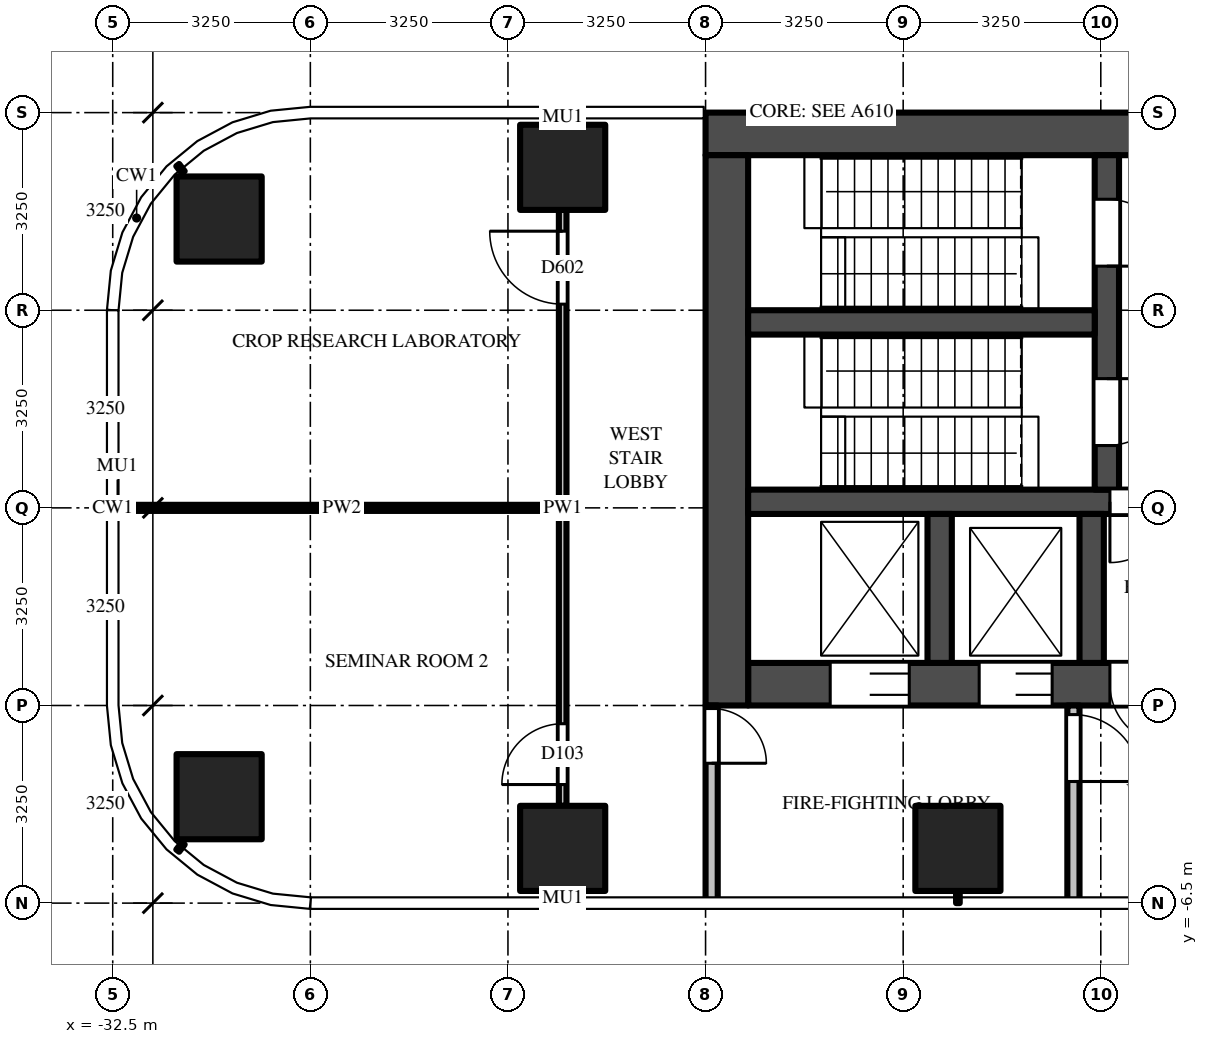
"""IFC4 building model, lengths in metres.
Left out: names, types, materials, properties, quantities, classifications, styles, units other than length and angle.
Written with IfcOpenShell. Run it as: python <this file> out.ifc"""

import sys

from ifc_helpers import new_model, si_unit, direction, frame, frame_2d, origin, origin_2d, place, context, subcontext, project, spatial, rectangle, extrude, source, transform, mapped, element, fill, save


model = new_model("IFC4")
c1 = context("Model", 3, precision=1e-05, world=origin(), true_north=direction((0.0, 1.0)))
c2 = subcontext(c1, "Body", "Model", "MODEL_VIEW")
j1 = project(units=[si_unit("LENGTHUNIT", "METRE"), si_unit("PLANEANGLEUNIT", "RADIAN")], contexts=[c1])
p1 = place(None, origin())
s1 = spatial("IfcSite", under=j1, at=p1, CompositionType="ELEMENT")
p2 = place(p1, origin())
s2 = spatial("IfcBuilding", under=s1, at=p2, CompositionType="ELEMENT")
p3 = place(p2, frame((0.0, 0.0, 79.0)))
s3 = spatial("IfcBuildingStorey", under=s2, at=p3, CompositionType="ELEMENT", Elevation=79.0)
m1 = source(origin(), c2, "Body", "SweptSolid", [
    extrude(rectangle(XDim=1.4, YDim=1.4, at=origin_2d()), origin(), (0.0, 0.0, 1.0), 4.5),
])
for number, where, z_axis, x_axis in (
    (1, (-18.6, -5.6, 0.0), (0.0, 0.0, 1.0), (1.0, 0.0, 0.0)),
    (2, (-25.1, -5.6, 0.0), (0.0, 0.0, 1.0), (1.0, 0.0, 0.0)),
    (3, (-30.75, -4.75, 0.0), (0.0, 0.0, 1.0), (1.0, 0.0, 0.0)),
    (4, (-25.1, 5.6, 0.0), (0.0, 0.0, 1.0), (1.0, 0.0, 0.0)),
    (5, (-30.75, 4.75, 0.0), (0.0, 0.0, 1.0), (1.0, 0.0, 0.0)),
):
    element("IfcColumn", number, at=place(p3, frame(where, z_axis=z_axis, x_axis=x_axis)), inside=s3, PredefinedType="COLUMN", context=c2, shape_type="MappedRepresentation", body=[
        mapped(m1, transform((0.0, 0.0, 0.0))),
    ])
m2 = source(origin(), c2, "Body", "SweptSolid", [
    extrude(rectangle(XDim=16.45, YDim=0.7, at=frame_2d((8.225, 0.0))), origin(), (0.0, 0.0, 1.0), 4.25),
])
p4 = place(p3, frame((-6.3, 6.15, 0.0), z_axis=(0.0, 0.0, 1.0), x_axis=(-1.0, 0.0, 0.0)))
e6 = element("IfcWall", 6, at=p4, inside=s3, PredefinedType="SHEAR", context=c2, shape_type="MappedRepresentation", body=[
    mapped(m2, transform((0.0, 0.0, 0.0))),
])
m3 = source(origin(), c2, "Body", "SweptSolid", [
    extrude(rectangle(XDim=14.85, YDim=0.7, at=frame_2d((7.425, 0.0))), origin(), (0.0, 0.0, 1.0), 4.25),
])
p5 = place(p3, frame((-7.2, -2.9, 0.0), z_axis=(0.0, 0.0, 1.0), x_axis=(-1.0, 0.0, 0.0)))
e7 = element("IfcWall", 7, at=p5, inside=s3, PredefinedType="SHEAR", context=c2, shape_type="MappedRepresentation", body=[
    mapped(m3, transform((0.0, 0.0, 0.0))),
])
m4 = source(origin(), c2, "Body", "SweptSolid", [
    extrude(rectangle(XDim=1.3, YDim=2.1, at=frame_2d((0.65, 1.05))), frame((0.0, 0.36, 0.0), z_axis=(0.0, -1.0, 0.0), x_axis=(1.0, 0.0, 0.0)), (0.0, 0.0, 1.0), 0.72),
])
p6 = place(p5, frame((12.2, 0.0, 0.0)))
e8 = element("IfcOpeningElement", 8, at=p6, cuts=e7, PredefinedType="OPENING", context=c2, shape_type="MappedRepresentation", body=[
    mapped(m4, transform((0.0, 0.0, 0.0))),
])
m5 = source(origin(), c2, "Body", "SweptSolid", [
    extrude(rectangle(XDim=1.2, YDim=2.1, at=frame_2d((0.6, 1.05))), frame((0.0, 0.36, 0.0), z_axis=(0.0, -1.0, 0.0), x_axis=(1.0, 0.0, 0.0)), (0.0, 0.0, 1.0), 0.72),
])
p7 = place(p5, frame((9.85, 0.0, 0.0)))
e9 = element("IfcOpeningElement", 9, at=p7, cuts=e7, PredefinedType="OPENING", context=c2, shape_type="MappedRepresentation", body=[
    mapped(m5, transform((0.0, 0.0, 0.0))),
])
m6 = source(origin(), c2, "Body", "SweptSolid", [
    extrude(rectangle(XDim=1.0, YDim=2.1, at=frame_2d((0.5, 1.05))), frame((0.0, 0.36, 0.0), z_axis=(0.0, -1.0, 0.0), x_axis=(1.0, 0.0, 0.0)), (0.0, 0.0, 1.0), 0.72),
])
p8 = place(p5, frame((7.9, 0.0, 0.0)))
e10 = element("IfcOpeningElement", 10, at=p8, cuts=e7, PredefinedType="OPENING", context=c2, shape_type="MappedRepresentation", body=[
    mapped(m6, transform((0.0, 0.0, 0.0))),
])
m7 = source(origin(), c2, "Body", "SweptSolid", [
    extrude(rectangle(XDim=0.8, YDim=2.1, at=frame_2d((0.4, 1.05))), frame((0.0, 0.36, 0.0), z_axis=(0.0, -1.0, 0.0), x_axis=(1.0, 0.0, 0.0)), (0.0, 0.0, 1.0), 0.72),
])
p9 = place(p5, frame((0.113, 0.0, 0.0)))
e11 = element("IfcOpeningElement", 11, at=p9, cuts=e7, PredefinedType="OPENING", context=c2, shape_type="MappedRepresentation", body=[
    mapped(m7, transform((0.0, 0.0, 0.0))),
])
p10 = place(p5, frame((1.288, 0.0, 0.0)))
e12 = element("IfcOpeningElement", 12, at=p10, cuts=e7, PredefinedType="OPENING", context=c2, shape_type="MappedRepresentation", body=[
    mapped(m7, transform((0.0, 0.0, 0.0))),
])
p11 = place(p5, frame((2.712, 0.0, 0.0)))
e13 = element("IfcOpeningElement", 13, at=p11, cuts=e7, PredefinedType="OPENING", context=c2, shape_type="MappedRepresentation", body=[
    mapped(m7, transform((0.0, 0.0, 0.0))),
])
p12 = place(p5, frame((3.887, 0.0, 0.0)))
e14 = element("IfcOpeningElement", 14, at=p12, cuts=e7, PredefinedType="OPENING", context=c2, shape_type="MappedRepresentation", body=[
    mapped(m7, transform((0.0, 0.0, 0.0))),
])
p13 = place(p5, frame((5.312, 0.0, 0.0)))
e15 = element("IfcOpeningElement", 15, at=p13, cuts=e7, PredefinedType="OPENING", context=c2, shape_type="MappedRepresentation", body=[
    mapped(m7, transform((0.0, 0.0, 0.0))),
])
p14 = place(p5, frame((6.488, 0.0, 0.0)))
e16 = element("IfcOpeningElement", 16, at=p14, cuts=e7, PredefinedType="OPENING", context=c2, shape_type="MappedRepresentation", body=[
    mapped(m7, transform((0.0, 0.0, 0.0))),
])
m8 = source(origin(), c2, "Body", "SweptSolid", [
    extrude(rectangle(XDim=9.05, YDim=0.7, at=frame_2d((4.525, 0.0))), origin(), (0.0, 0.0, 1.0), 4.25),
])
p15 = place(p3, frame((-22.4, 5.8, 0.0), z_axis=(0.0, 0.0, 1.0), x_axis=(0.0, -1.0, 0.0)))
e17 = element("IfcWall", 17, at=p15, inside=s3, PredefinedType="SHEAR", context=c2, shape_type="MappedRepresentation", body=[
    mapped(m8, transform((0.0, 0.0, 0.0))),
])
m9 = source(origin(), c2, "Body", "SweptSolid", [
    extrude(rectangle(XDim=14.85, YDim=0.4, at=frame_2d((7.425, 0.0))), origin(), (0.0, 0.0, 1.0), 4.25),
])
p16 = place(p3, frame((-7.2, 0.1, 0.0), z_axis=(0.0, 0.0, 1.0), x_axis=(-1.0, 0.0, 0.0)))
e18 = element("IfcWall", 18, at=p16, inside=s3, PredefinedType="SHEAR", context=c2, shape_type="MappedRepresentation", body=[
    mapped(m9, transform((0.0, 0.0, 0.0))),
])
m10 = source(origin(), c2, "Body", "SweptSolid", [
    extrude(rectangle(XDim=1.0, YDim=2.1, at=frame_2d((0.5, 1.05))), frame((0.0, 0.21, 0.0), z_axis=(0.0, -1.0, 0.0), x_axis=(1.0, 0.0, 0.0)), (0.0, 0.0, 1.0), 0.42),
])
p17 = place(p16, frame((7.9, 0.0, 0.0)))
e19 = element("IfcOpeningElement", 19, at=p17, cuts=e18, PredefinedType="OPENING", context=c2, shape_type="MappedRepresentation", body=[
    mapped(m10, transform((0.0, 0.0, 0.0))),
])
m11 = source(origin(), c2, "Body", "SweptSolid", [
    extrude(rectangle(XDim=5.5, YDim=0.4, at=frame_2d((2.75, 0.0))), origin(), (0.0, 0.0, 1.0), 4.25),
])
p18 = place(p3, frame((-16.15, 5.8, 0.0), z_axis=(0.0, 0.0, 1.0), x_axis=(0.0, -1.0, 0.0)))
e20 = element("IfcWall", 20, at=p18, inside=s3, PredefinedType="SHEAR", context=c2, shape_type="MappedRepresentation", body=[
    mapped(m11, transform((0.0, 0.0, 0.0))),
])
m12 = source(origin(), c2, "Body", "SweptSolid", [
    extrude(rectangle(XDim=1.1, YDim=2.1, at=frame_2d((0.55, 1.05))), frame((0.0, 0.21, 0.0), z_axis=(0.0, -1.0, 0.0), x_axis=(1.0, 0.0, 0.0)), (0.0, 0.0, 1.0), 0.42),
])
p19 = place(p18, frame((0.725, 0.0, 0.0)))
e21 = element("IfcOpeningElement", 21, at=p19, cuts=e20, PredefinedType="OPENING", context=c2, shape_type="MappedRepresentation", body=[
    mapped(m12, transform((0.0, 0.0, 0.0))),
])
p20 = place(p18, frame((3.675, 0.0, 0.0)))
e22 = element("IfcOpeningElement", 22, at=p20, cuts=e20, PredefinedType="OPENING", context=c2, shape_type="MappedRepresentation", body=[
    mapped(m12, transform((0.0, 0.0, 0.0))),
])
m13 = source(origin(), c2, "Body", "SweptSolid", [
    extrude(rectangle(XDim=5.7, YDim=0.4, at=frame_2d((2.85, 0.0))), origin(), (0.0, 0.0, 1.0), 4.25),
])
p21 = place(p3, frame((-16.35, 3.05, 0.0), z_axis=(0.0, 0.0, 1.0), x_axis=(-1.0, 0.0, 0.0)))
e23 = element("IfcWall", 23, at=p21, inside=s3, PredefinedType="SHEAR", context=c2, shape_type="MappedRepresentation", body=[
    mapped(m13, transform((0.0, 0.0, 0.0))),
])
m14 = source(origin(), c2, "Body", "SweptSolid", [
    extrude(rectangle(XDim=2.45, YDim=0.4, at=frame_2d((1.225, 0.0))), origin(), (0.0, 0.0, 1.0), 4.25),
])
for number, where, z_axis, x_axis in (
    (24, (-16.4, -0.1, 0.0), (0.0, 0.0, 1.0), (0.0, -1.0, 0.0)),
    (25, (-18.9, -0.1, 0.0), (0.0, 0.0, 1.0), (0.0, -1.0, 0.0)),
):
    element("IfcWall", number, at=place(p3, frame(where, z_axis=z_axis, x_axis=x_axis)), inside=s3, PredefinedType="SHEAR", context=c2, shape_type="MappedRepresentation", body=[
        mapped(m14, transform((0.0, 0.0, 0.0))),
    ])
m15 = source(origin(), c2, "Body", "SweptSolid", [
    extrude(rectangle(XDim=3.25, YDim=0.2, at=frame_2d((1.625, 0.0))), origin(), (0.0, 0.0, 1.0), 4.25),
])
p22 = place(p3, frame((-16.7, -3.25, 0.0), z_axis=(0.0, 0.0, 1.0), x_axis=(0.0, -1.0, 0.0)))
e26 = element("IfcWall", 26, at=p22, inside=s3, PredefinedType="PARTITIONING", context=c2, shape_type="MappedRepresentation", body=[
    mapped(m15, transform((0.0, 0.0, 0.0))),
])
m16 = source(origin(), c2, "Body", "SweptSolid", [
    extrude(rectangle(XDim=1.1, YDim=2.1, at=frame_2d((0.55, 1.05))), frame((0.0, 0.11, 0.0), z_axis=(0.0, -1.0, 0.0), x_axis=(1.0, 0.0, 0.0)), (0.0, 0.0, 1.0), 0.22),
])
p23 = place(p22, frame((0.15, 0.0, 0.0)))
e27 = element("IfcOpeningElement", 27, at=p23, cuts=e26, PredefinedType="OPENING", context=c2, shape_type="MappedRepresentation", body=[
    mapped(m16, transform((0.0, 0.0, 0.0))),
])
p24 = place(p3, frame((-22.65, -3.25, 0.0), z_axis=(0.0, 0.0, 1.0), x_axis=(0.0, -1.0, 0.0)))
e28 = element("IfcWall", 28, at=p24, inside=s3, PredefinedType="PARTITIONING", context=c2, shape_type="MappedRepresentation", body=[
    mapped(m15, transform((0.0, 0.0, 0.0))),
])
m17 = source(origin(), c2, "Body", "SweptSolid", [
    extrude(rectangle(XDim=0.9, YDim=2.1, at=frame_2d((0.45, 1.05))), frame((0.0, 0.11, 0.0), z_axis=(0.0, -1.0, 0.0), x_axis=(1.0, 0.0, 0.0)), (0.0, 0.0, 1.0), 0.22),
])
p25 = place(p24, frame((0.05, 0.0, 0.0)))
e29 = element("IfcOpeningElement", 29, at=p25, cuts=e28, PredefinedType="OPENING", context=c2, shape_type="MappedRepresentation", body=[
    mapped(m17, transform((0.0, 0.0, 0.0))),
])
m18 = source(origin(), c2, "Body", "SweptSolid", [
    extrude(rectangle(XDim=9.8, YDim=0.125, at=frame_2d((4.9, 0.0))), origin(), (0.0, 0.0, 1.0), 3.468),
])
p26 = place(p3, frame((-25.1, -4.9, 0.0), z_axis=(0.0, 0.0, 1.0), x_axis=(0.0, 1.0, 0.0)))
e30 = element("IfcWall", 30, at=p26, inside=s3, PredefinedType="PARTITIONING", context=c2, shape_type="MappedRepresentation", body=[
    mapped(m18, transform((0.0, 0.0, 0.0))),
])
m19 = source(origin(), c2, "Body", "SweptSolid", [
    extrude(rectangle(XDim=1.0, YDim=2.1, at=frame_2d((0.5, 1.05))), frame((0.0, 0.073, 0.0), z_axis=(0.0, -1.0, 0.0), x_axis=(1.0, 0.0, 0.0)), (0.0, 0.0, 1.0), 0.145),
])
p27 = place(p26, frame((0.35, 0.0, 0.0)))
e31 = element("IfcOpeningElement", 31, at=p27, cuts=e30, PredefinedType="OPENING", context=c2, shape_type="MappedRepresentation", body=[
    mapped(m19, transform((0.0, 0.0, 0.0))),
])
m20 = source(origin(), c2, "Body", "SweptSolid", [
    extrude(rectangle(XDim=1.2, YDim=2.1, at=frame_2d((0.6, 1.05))), frame((0.0, 0.073, 0.0), z_axis=(0.0, -1.0, 0.0), x_axis=(1.0, 0.0, 0.0)), (0.0, 0.0, 1.0), 0.145),
])
p28 = place(p26, frame((8.25, 0.0, 0.0)))
e32 = element("IfcOpeningElement", 32, at=p28, cuts=e30, PredefinedType="OPENING", context=c2, shape_type="MappedRepresentation", body=[
    mapped(m20, transform((0.0, 0.0, 0.0))),
])
m21 = source(origin(), c2, "Body", "SweptSolid", [
    extrude(rectangle(XDim=7.137, YDim=0.1, at=frame_2d((3.569, 0.0))), origin(), (0.0, 0.0, 1.0), 3.33),
])
p29 = place(p3, frame((-32.3, 0.0, 0.0), z_axis=(0.0, 0.0, 1.0), x_axis=(1.0, 0.0, 0.0)))
e33 = element("IfcWall", 33, at=p29, inside=s3, PredefinedType="PARTITIONING", context=c2, shape_type="MappedRepresentation", body=[
    mapped(m21, transform((0.0, 0.0, 0.0))),
])
m22 = source(origin(), c2, "Body", "SweptSolid", [
    extrude(rectangle(XDim=1.3, YDim=2.1, at=frame_2d((0.65, 1.05))), frame((0.0, -0.275, 0.0), z_axis=(0.0, -1.0, 0.0), x_axis=(1.0, 0.0, 0.0)), (0.0, 0.0, 1.0), 0.05),
])
p30 = place(p6, origin())
e34 = element("IfcDoor", 34, at=p30, inside=s3, OperationType="DOUBLE_DOOR_SLIDING", PredefinedType="DOOR", context=c2, shape_type="MappedRepresentation", body=[
    mapped(m22, transform((0.0, 0.0, 0.0))),
])
fill(e8, e34)
m23 = source(origin(), c2, "Body", "SweptSolid", [
    extrude(rectangle(XDim=1.2, YDim=2.1, at=frame_2d((0.6, 1.05))), frame((0.0, -0.275, 0.0), z_axis=(0.0, -1.0, 0.0), x_axis=(1.0, 0.0, 0.0)), (0.0, 0.0, 1.0), 0.05),
])
p31 = place(p7, origin())
e35 = element("IfcDoor", 35, at=p31, inside=s3, OperationType="DOUBLE_DOOR_SLIDING", PredefinedType="DOOR", context=c2, shape_type="MappedRepresentation", body=[
    mapped(m23, transform((0.0, 0.0, 0.0))),
])
fill(e9, e35)
m24 = source(origin(), c2, "Body", "SweptSolid", [
    extrude(rectangle(XDim=1.1, YDim=2.1, at=frame_2d((0.55, 1.05))), frame((0.0, 0.025, 0.0), z_axis=(0.0, -1.0, 0.0), x_axis=(1.0, 0.0, 0.0)), (0.0, 0.0, 1.0), 0.05),
])
p32 = place(p19, origin())
e36 = element("IfcDoor", 36, at=p32, inside=s3, OperationType="SINGLE_SWING_RIGHT", PredefinedType="DOOR", context=c2, shape_type="MappedRepresentation", body=[
    mapped(m24, transform((0.0, 0.0, 0.0))),
])
fill(e21, e36)
p33 = place(p20, origin())
e37 = element("IfcDoor", 37, at=p33, inside=s3, OperationType="SINGLE_SWING_LEFT", PredefinedType="DOOR", context=c2, shape_type="MappedRepresentation", body=[
    mapped(m24, transform((0.0, 0.0, 0.0))),
])
fill(e22, e37)
m25 = source(origin(), c2, "Body", "SweptSolid", [
    extrude(rectangle(XDim=1.0, YDim=2.1, at=frame_2d((0.5, 1.05))), frame((0.0, 0.025, 0.0), z_axis=(0.0, -1.0, 0.0), x_axis=(1.0, 0.0, 0.0)), (0.0, 0.0, 1.0), 0.05),
])
p34 = place(p17, origin())
e38 = element("IfcDoor", 38, at=p34, inside=s3, OperationType="SINGLE_SWING_RIGHT", PredefinedType="DOOR", context=c2, shape_type="MappedRepresentation", body=[
    mapped(m25, transform((0.0, 0.0, 0.0))),
])
fill(e19, e38)
m26 = source(origin(), c2, "Body", "SweptSolid", [
    extrude(rectangle(XDim=1.0, YDim=2.1, at=frame_2d((0.5, 1.05))), frame((0.0, -0.275, 0.0), z_axis=(0.0, -1.0, 0.0), x_axis=(1.0, 0.0, 0.0)), (0.0, 0.0, 1.0), 0.05),
])
p35 = place(p8, origin())
e39 = element("IfcDoor", 39, at=p35, inside=s3, OperationType="SINGLE_SWING_LEFT", PredefinedType="DOOR", context=c2, shape_type="MappedRepresentation", body=[
    mapped(m26, transform((0.0, 0.0, 0.0))),
])
fill(e10, e39)
p36 = place(p23, origin())
e40 = element("IfcDoor", 40, at=p36, inside=s3, OperationType="SINGLE_SWING_RIGHT", PredefinedType="DOOR", context=c2, shape_type="MappedRepresentation", body=[
    mapped(m24, transform((0.0, 0.0, 0.0))),
])
fill(e27, e40)
m27 = source(origin(), c2, "Body", "SweptSolid", [
    extrude(rectangle(XDim=0.9, YDim=2.1, at=frame_2d((0.45, 1.05))), frame((0.0, 0.025, 0.0), z_axis=(0.0, -1.0, 0.0), x_axis=(1.0, 0.0, 0.0)), (0.0, 0.0, 1.0), 0.05),
])
p37 = place(p25, origin())
e41 = element("IfcDoor", 41, at=p37, inside=s3, OperationType="SINGLE_SWING_RIGHT", PredefinedType="DOOR", context=c2, shape_type="MappedRepresentation", body=[
    mapped(m27, transform((0.0, 0.0, 0.0))),
])
fill(e29, e41)
p38 = place(p27, origin())
e42 = element("IfcDoor", 42, at=p38, inside=s3, OperationType="SINGLE_SWING_LEFT", PredefinedType="DOOR", context=c2, shape_type="MappedRepresentation", body=[
    mapped(m25, transform((0.0, 0.0, 0.0))),
])
fill(e31, e42)
m28 = source(origin(), c2, "Body", "SweptSolid", [
    extrude(rectangle(XDim=1.2, YDim=2.1, at=frame_2d((0.6, 1.05))), frame((0.0, 0.025, 0.0), z_axis=(0.0, -1.0, 0.0), x_axis=(1.0, 0.0, 0.0)), (0.0, 0.0, 1.0), 0.05),
])
p39 = place(p28, origin())
e43 = element("IfcDoor", 43, at=p39, inside=s3, OperationType="SINGLE_SWING_RIGHT", PredefinedType="DOOR", context=c2, shape_type="MappedRepresentation", body=[
    mapped(m28, transform((0.0, 0.0, 0.0))),
])
fill(e32, e43)
save(model, sys.argv[1])
